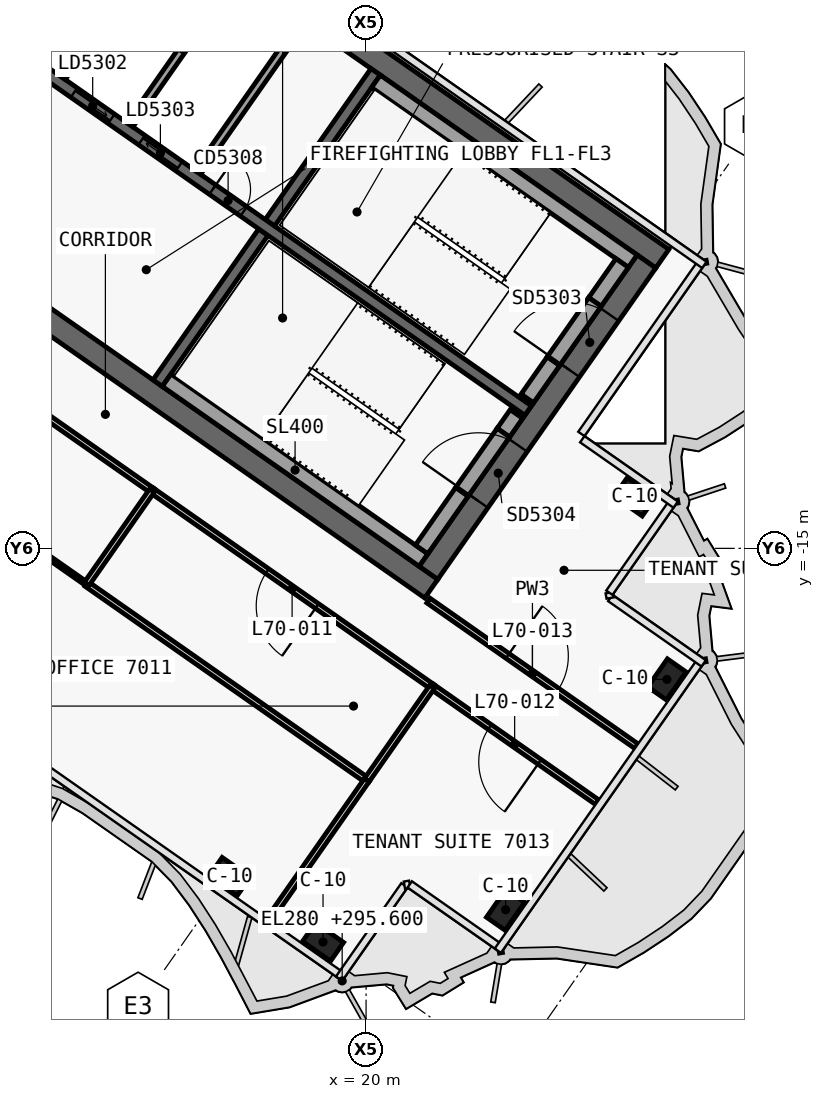
"""IFC4 building model, lengths in metres.
Left out: names, types, materials, properties, quantities, classifications, styles, units other than length and angle.
Written with IfcOpenShell. Run it as: python <this file> out.ifc"""

import sys

from ifc_helpers import new_model, si_unit, direction, frame, frame_2d, origin, origin_2d, place, context, subcontext, project, spatial, polyline, rectangle, outline, extrude, element, fill, save


model = new_model("IFC4")
c1 = context("Model", 3, precision=1e-05, world=origin(), true_north=direction((0.0, 1.0)))
c2 = subcontext(c1, "Body", "Model", "MODEL_VIEW")
j1 = project(units=[si_unit("LENGTHUNIT", "METRE"), si_unit("PLANEANGLEUNIT", "RADIAN")], contexts=[c1])
p1 = place(None, origin())
s1 = spatial("IfcSite", under=j1, at=p1, CompositionType="ELEMENT")
p2 = place(p1, origin())
s2 = spatial("IfcBuilding", under=s1, at=p2, CompositionType="ELEMENT")
p3 = place(p2, frame((0.0, 0.0, 295.6)))
s3 = spatial("IfcBuildingStorey", under=s2, at=p3, CompositionType="ELEMENT", Elevation=295.6)
p4 = place(p3, frame((0.028, 12.066, 0.0), z_axis=(0.0, 0.0, 1.0), x_axis=(0.819151382952, -0.573577380837, 0.0)))
e1 = element("IfcWall", 1, at=p4, inside=s3, PredefinedType="SHEAR", context=c2, shape_type="SweptSolid", body=[
    extrude(outline(polyline([(33.898, 0.3), (0.0, 0.3), (0.42, -0.3), (33.898, -0.3), (33.898, 0.3)])), origin(), (0.0, 0.0, 1.0), 3.9),
])
p5 = place(p3, frame((0.028, -0.874, 0.0), z_axis=(0.0, 0.0, 1.0), x_axis=(0.819150035022, -0.573579305871, 0.0)))
e2 = element("IfcWall", 2, at=p5, inside=s3, PredefinedType="SHEAR", context=c2, shape_type="SweptSolid", body=[
    extrude(outline(polyline([(26.476, 0.3), (0.0, 0.3), (0.42, -0.3), (26.476, -0.3), (26.476, 0.3)])), origin(), (0.0, 0.0, 1.0), 3.9),
])
p6 = place(p5, frame((6.576, 0.0, 0.0)))
e3 = element("IfcOpeningElement", 3, at=p6, cuts=e2, PredefinedType="OPENING", context=c2, shape_type="SweptSolid", body=[
    extrude(rectangle(XDim=1.5, YDim=2.1, at=frame_2d((0.75, 1.05))), frame((0.0, 0.31, 0.0), z_axis=(0.0, -1.0, 0.0), x_axis=(1.0, 0.0, 0.0)), (0.0, 0.0, 1.0), 0.62),
])
p7 = place(p5, frame((12.226, 0.0, 0.0)))
e4 = element("IfcOpeningElement", 4, at=p7, cuts=e2, PredefinedType="OPENING", context=c2, shape_type="SweptSolid", body=[
    extrude(rectangle(XDim=1.5, YDim=2.1, at=frame_2d((0.75, 1.05))), frame((0.0, 0.31, 0.0), z_axis=(0.0, -1.0, 0.0), x_axis=(1.0, 0.0, 0.0)), (0.0, 0.0, 1.0), 0.62),
])
p8 = place(p3, frame((21.642, -15.642, 0.0), z_axis=(0.0, 0.0, 1.0), x_axis=(0.573586866468, 0.819144740944, 0.0)))
e5 = element("IfcWall", 5, at=p8, inside=s3, PredefinedType="SHEAR", context=c2, shape_type="SweptSolid", body=[
    extrude(outline(polyline([(10.0, 0.3), (0.0, 0.3), (0.0, -0.3), (10.0, -0.3), (10.0, 0.3)])), origin(), (0.0, 0.0, 1.0), 3.9),
])
p9 = place(p8, frame((6.5, 0.0, 0.0)))
e6 = element("IfcOpeningElement", 6, at=p9, cuts=e5, PredefinedType="OPENING", context=c2, shape_type="SweptSolid", body=[
    extrude(rectangle(XDim=1.8, YDim=2.1, at=frame_2d((0.9, 1.05))), frame((0.0, 0.31, 0.0), z_axis=(0.0, -1.0, 0.0), x_axis=(1.0, 0.0, 0.0)), (0.0, 0.0, 1.0), 0.62),
])
p10 = place(p8, frame((2.3, 0.0, 0.0)))
e7 = element("IfcOpeningElement", 7, at=p10, cuts=e5, PredefinedType="OPENING", context=c2, shape_type="SweptSolid", body=[
    extrude(rectangle(XDim=1.8, YDim=2.1, at=frame_2d((0.9, 1.05))), frame((0.0, 0.31, 0.0), z_axis=(0.0, -1.0, 0.0), x_axis=(1.0, 0.0, 0.0)), (0.0, 0.0, 1.0), 0.62),
])
p11 = place(p3, frame((14.515, -10.652, 0.0), z_axis=(0.0, 0.0, 1.0), x_axis=(0.573560315113, 0.819163332265, 0.0)))
e8 = element("IfcWall", 8, at=p11, inside=s3, PredefinedType="SHEAR", context=c2, shape_type="SweptSolid", body=[
    extrude(outline(polyline([(0.0, 0.15), (0.0, -0.15), (4.85, -0.15), (4.85, 0.15), (0.0, 0.15)])), origin(), (0.0, 0.0, 1.0), 3.9),
])
p12 = place(p3, frame((17.469, -6.433, 0.0), z_axis=(0.0, 0.0, 1.0), x_axis=(0.573594092424, 0.81913968109, 0.0)))
e9 = element("IfcWall", 9, at=p12, inside=s3, PredefinedType="SHEAR", context=c2, shape_type="SweptSolid", body=[
    extrude(outline(polyline([(4.85, -0.15), (4.85, 0.15), (0.0, 0.15), (0.0, -0.15), (4.85, -0.15)])), origin(), (0.0, 0.0, 1.0), 3.9),
])
p13 = place(p3, frame((2.638, 3.768, 0.0), z_axis=(0.0, 0.0, 1.0), x_axis=(0.819155014212, -0.573572194837, 0.0)))
e10 = element("IfcWall", 10, at=p13, inside=s3, PredefinedType="SHEAR", context=c2, shape_type="SweptSolid", body=[
    extrude(outline(polyline([(0.0, 0.15), (0.0, -0.15), (26.4, -0.15), (26.4, 0.15), (0.0, 0.15)])), origin(), (0.0, 0.0, 1.0), 3.9),
])
p14 = place(p13, frame((9.637, 0.0, 0.0)))
e11 = element("IfcOpeningElement", 11, at=p14, cuts=e10, PredefinedType="OPENING", context=c2, shape_type="SweptSolid", body=[
    extrude(rectangle(XDim=1.2, YDim=2.1, at=frame_2d((0.6, 1.05))), frame((0.0, 0.16, 0.0), z_axis=(0.0, -1.0, 0.0), x_axis=(1.0, 0.0, 0.0)), (0.0, 0.0, 1.0), 0.32),
])
p15 = place(p13, frame((11.812, 0.0, 0.0)))
e12 = element("IfcOpeningElement", 12, at=p15, cuts=e10, PredefinedType="OPENING", context=c2, shape_type="SweptSolid", body=[
    extrude(rectangle(XDim=1.2, YDim=2.1, at=frame_2d((0.6, 1.05))), frame((0.0, 0.16, 0.0), z_axis=(0.0, -1.0, 0.0), x_axis=(1.0, 0.0, 0.0)), (0.0, 0.0, 1.0), 0.32),
])
p16 = place(p13, frame((13.988, 0.0, 0.0)))
e13 = element("IfcOpeningElement", 13, at=p16, cuts=e10, PredefinedType="OPENING", context=c2, shape_type="SweptSolid", body=[
    extrude(rectangle(XDim=1.2, YDim=2.1, at=frame_2d((0.6, 1.05))), frame((0.0, 0.16, 0.0), z_axis=(0.0, -1.0, 0.0), x_axis=(1.0, 0.0, 0.0)), (0.0, 0.0, 1.0), 0.32),
])
p17 = place(p13, frame((16.262, 0.0, 0.0)))
e14 = element("IfcOpeningElement", 14, at=p17, cuts=e10, PredefinedType="OPENING", context=c2, shape_type="SweptSolid", body=[
    extrude(rectangle(XDim=1.0, YDim=2.1, at=frame_2d((0.5, 1.05))), frame((0.0, 0.16, 0.0), z_axis=(0.0, -1.0, 0.0), x_axis=(1.0, 0.0, 0.0)), (0.0, 0.0, 1.0), 0.32),
])
for number, where, z_axis, x_axis in (
    (15, (16.41, -23.637, 0.0), (0.0, 0.0, 1.0), (0.819, -0.574, 0.0)),
    (16, (18.867, -25.358, 0.0), (0.0, 0.0, 1.0), (0.819, -0.574, 0.0)),
    (17, (27.07, -13.644, 0.0), (0.0, 0.0, 1.0), (0.819, -0.574, 0.0)),
    (18, (23.672, -24.51, 0.0), (0.0, 0.0, 1.0), (0.574, 0.819, 0.0)),
    (19, (27.917, -18.449, 0.0), (0.0, 0.0, 1.0), (0.574, 0.819, 0.0)),
):
    element("IfcColumn", number, at=place(p3, frame(where, z_axis=z_axis, x_axis=x_axis)), inside=s3, PredefinedType="COLUMN", context=c2, shape_type="SweptSolid", body=[
        extrude(rectangle(XDim=0.9, YDim=0.6, at=origin_2d()), origin(), (0.0, 0.0, 1.0), 3.9),
    ])
p18 = place(p3, frame((12.001, -2.605, 0.0), z_axis=(0.0, 0.0, 1.0), x_axis=(0.573560315113, 0.819163332265, 0.0)))
e20 = element("IfcWall", 20, at=p18, inside=s3, PredefinedType="SOLIDWALL", context=c2, shape_type="SweptSolid", body=[
    extrude(rectangle(XDim=4.85, YDim=0.2, at=frame_2d((2.425, 0.0))), origin(), (0.0, 0.0, 1.0), 3.9),
])
p19 = place(p3, frame((13.783, -3.852, 0.0), z_axis=(0.0, 0.0, 1.0), x_axis=(0.573594092424, 0.81913968109, 0.0)))
e21 = element("IfcWall", 21, at=p19, inside=s3, PredefinedType="SOLIDWALL", context=c2, shape_type="SweptSolid", body=[
    extrude(rectangle(XDim=4.85, YDim=0.2, at=frame_2d((2.425, 0.0))), origin(), (0.0, 0.0, 1.0), 3.9),
])
p20 = place(p3, frame((15.565, -5.1, 0.0), z_axis=(0.0, 0.0, 1.0), x_axis=(0.573560315113, 0.819163332265, 0.0)))
e22 = element("IfcWall", 22, at=p20, inside=s3, PredefinedType="SOLIDWALL", context=c2, shape_type="SweptSolid", body=[
    extrude(rectangle(XDim=4.85, YDim=0.2, at=frame_2d((2.425, 0.0))), origin(), (0.0, 0.0, 1.0), 3.9),
])
p21 = place(p3, frame((20.259, -2.71, 0.0), z_axis=(0.0, 0.0, 1.0), x_axis=(0.81914849389, -0.573581506813, 0.0)))
e23 = element("IfcWall", 23, at=p21, inside=s3, PredefinedType="SOLIDWALL", context=c2, shape_type="SweptSolid", body=[
    extrude(rectangle(XDim=8.25, YDim=0.4, at=frame_2d((4.125, 0.0))), origin(), (0.0, 0.0, 1.0), 3.62),
])
p22 = place(p3, frame((24.244, -11.055, 0.0), z_axis=(0.0, 0.0, 1.0), x_axis=(0.573571582932, 0.819155442668, 0.0)))
e24 = element("IfcWall", 24, at=p22, inside=s3, PredefinedType="SOLIDWALL", context=c2, shape_type="SweptSolid", body=[
    extrude(rectangle(XDim=1.2, YDim=0.4, at=frame_2d((0.6, 0.0))), origin(), (0.0, 0.0, 1.0), 3.62),
])
p23 = place(p3, frame((26.022, -8.515, 0.0), z_axis=(0.0, 0.0, 1.0), x_axis=(0.573619628835, 0.819121798889, 0.0)))
e25 = element("IfcWall", 25, at=p23, inside=s3, PredefinedType="SOLIDWALL", context=c2, shape_type="SweptSolid", body=[
    extrude(rectangle(XDim=1.25, YDim=0.4, at=frame_2d((0.625, 0.0))), origin(), (0.0, 0.0, 1.0), 3.62),
])
p24 = place(p3, frame((24.932, -10.072, 2.15), z_axis=(0.0, 0.0, 1.0), x_axis=(0.573591692345, 0.819141361715, 0.0)))
e26 = element("IfcWall", 26, at=p24, inside=s3, PredefinedType="SOLIDWALL", context=c2, shape_type="SweptSolid", body=[
    extrude(rectangle(XDim=1.9, YDim=0.4, at=frame_2d((0.95, 0.0))), origin(), (0.0, 0.0, 1.0), 1.47),
])
p25 = place(p3, frame((14.753, -10.574, 0.0), z_axis=(0.0, 0.0, 1.0), x_axis=(0.819158229677, -0.573567602601, 0.0)))
e27 = element("IfcWall", 27, at=p25, inside=s3, PredefinedType="SOLIDWALL", context=c2, shape_type="SweptSolid", body=[
    extrude(rectangle(XDim=8.25, YDim=0.4, at=frame_2d((4.125, 0.0))), origin(), (0.0, 0.0, 1.0), 3.62),
])
p26 = place(p3, frame((21.462, -15.028, 0.0), z_axis=(0.0, 0.0, 1.0), x_axis=(0.573559770908, 0.819163713305, 0.0)))
e28 = element("IfcWall", 28, at=p26, inside=s3, PredefinedType="SOLIDWALL", context=c2, shape_type="SweptSolid", body=[
    extrude(rectangle(XDim=1.85, YDim=0.4, at=frame_2d((0.925, 0.0))), origin(), (0.0, 0.0, 1.0), 3.62),
])
p27 = place(p3, frame((23.613, -11.956, 0.0), z_axis=(0.0, 0.0, 1.0), x_axis=(0.573435029941, 0.819251039936, 0.0)))
e29 = element("IfcWall", 29, at=p27, inside=s3, PredefinedType="SOLIDWALL", context=c2, shape_type="SweptSolid", body=[
    extrude(rectangle(XDim=0.6, YDim=0.4, at=frame_2d((0.3, 0.0))), origin(), (0.0, 0.0, 1.0), 3.62),
])
p28 = place(p3, frame((22.523, -13.512, 2.15), z_axis=(0.0, 0.0, 1.0), x_axis=(0.573591692345, 0.819141361715, 0.0)))
e30 = element("IfcWall", 30, at=p28, inside=s3, PredefinedType="SOLIDWALL", context=c2, shape_type="SweptSolid", body=[
    extrude(rectangle(XDim=1.9, YDim=0.4, at=frame_2d((0.95, 0.0))), origin(), (0.0, 0.0, 1.0), 1.47),
])
p29 = place(p3, frame((21.642, -16.375, 0.0), z_axis=(0.0, 0.0, 1.0), x_axis=(0.819147777977, -0.573582529227, 0.0)))
e31 = element("IfcWall", 31, at=p29, inside=s3, PredefinedType="PARTITIONING", context=c2, shape_type="SweptSolid", body=[
    extrude(rectangle(XDim=6.68, YDim=0.15, at=frame_2d((3.34, 0.0))), origin(), (0.0, 0.0, 1.0), 3.0),
])
p30 = place(p29, frame((2.54, 0.0, 0.0)))
e32 = element("IfcOpeningElement", 32, at=p30, cuts=e31, PredefinedType="OPENING", context=c2, shape_type="SweptSolid", body=[
    extrude(rectangle(XDim=1.6, YDim=2.1, at=frame_2d((0.8, 1.05))), frame((0.0, 0.085, 0.0), z_axis=(0.0, -1.0, 0.0), x_axis=(1.0, 0.0, 0.0)), (0.0, 0.0, 1.0), 0.17),
])
p31 = place(p3, frame((14.369, -13.479, 0.0), z_axis=(0.0, 0.0, 1.0), x_axis=(-0.819154371039, 0.573573113393, 0.0)))
e33 = element("IfcWall", 33, at=p31, inside=s3, PredefinedType="PARTITIONING", context=c2, shape_type="SweptSolid", body=[
    extrude(rectangle(XDim=10.502, YDim=0.15, at=frame_2d((5.251, 0.0))), origin(), (0.0, 0.0, 1.0), 3.05),
])
p32 = place(p31, frame((4.451, 0.0, 0.0)))
e34 = element("IfcOpeningElement", 34, at=p32, cuts=e33, PredefinedType="OPENING", context=c2, shape_type="SweptSolid", body=[
    extrude(rectangle(XDim=1.6, YDim=2.1, at=frame_2d((0.8, 1.05))), frame((0.0, 0.085, 0.0), z_axis=(0.0, -1.0, 0.0), x_axis=(1.0, 0.0, 0.0)), (0.0, 0.0, 1.0), 0.17),
])
p33 = place(p3, frame((21.741, -18.642, 0.0), z_axis=(0.0, 0.0, 1.0), x_axis=(-0.819164400877, 0.57355878891, 0.0)))
e35 = element("IfcWall", 35, at=p33, inside=s3, PredefinedType="PARTITIONING", context=c2, shape_type="SweptSolid", body=[
    extrude(rectangle(XDim=9.004, YDim=0.15, at=frame_2d((4.502, 0.0))), origin(), (0.0, 0.0, 1.0), 3.05),
])
p34 = place(p33, frame((3.702, 0.0, 0.0)))
e36 = element("IfcOpeningElement", 36, at=p34, cuts=e35, PredefinedType="OPENING", context=c2, shape_type="SweptSolid", body=[
    extrude(rectangle(XDim=1.6, YDim=2.1, at=frame_2d((0.8, 1.05))), frame((0.0, 0.085, 0.0), z_axis=(0.0, -1.0, 0.0), x_axis=(1.0, 0.0, 0.0)), (0.0, 0.0, 1.0), 0.17),
])
p35 = place(p3, frame((26.081, -21.68, 0.0), z_axis=(0.0, 0.0, 1.0), x_axis=(-0.81915186898, 0.573576686718, 0.0)))
e37 = element("IfcWall", 37, at=p35, inside=s3, PredefinedType="PARTITIONING", context=c2, shape_type="SweptSolid", body=[
    extrude(rectangle(XDim=5.302, YDim=0.15, at=frame_2d((2.651, 0.0))), origin(), (0.0, 0.0, 1.0), 3.0),
])
p36 = place(p35, frame((1.851, 0.0, 0.0)))
e38 = element("IfcOpeningElement", 38, at=p36, cuts=e37, PredefinedType="OPENING", context=c2, shape_type="SweptSolid", body=[
    extrude(rectangle(XDim=1.6, YDim=2.1, at=frame_2d((0.8, 1.05))), frame((0.0, 0.085, 0.0), z_axis=(0.0, -1.0, 0.0), x_axis=(1.0, 0.0, 0.0)), (0.0, 0.0, 1.0), 0.17),
])
p37 = place(p3, frame((12.646, -15.937, 0.0), z_axis=(0.0, 0.0, 1.0), x_axis=(-0.81914779845, 0.57358249999, 0.0)))
e39 = element("IfcWall", 39, at=p37, inside=s3, PredefinedType="PARTITIONING", context=c2, shape_type="SweptSolid", body=[
    extrude(rectangle(XDim=10.5, YDim=0.1, at=frame_2d((5.25, 0.0))), origin(), (0.0, 0.0, 1.0), 3.05),
])
p38 = place(p37, frame((4.8, 0.0, 0.0)))
e40 = element("IfcOpeningElement", 40, at=p38, cuts=e39, PredefinedType="OPENING", context=c2, shape_type="SweptSolid", body=[
    extrude(rectangle(XDim=0.9, YDim=2.1, at=frame_2d((0.45, 1.05))), frame((0.0, 0.06, 0.0), z_axis=(0.0, -1.0, 0.0), x_axis=(1.0, 0.0, 0.0)), (0.0, 0.0, 1.0), 0.12),
])
p39 = place(p3, frame((12.646, -15.937, 0.0), z_axis=(0.0, 0.0, 1.0), x_axis=(0.819150352239, -0.573578852841, 0.0)))
e41 = element("IfcWall", 41, at=p39, inside=s3, PredefinedType="PARTITIONING", context=c2, shape_type="SweptSolid", body=[
    extrude(rectangle(XDim=9.0, YDim=0.15, at=frame_2d((4.5, 0.0))), origin(), (0.0, 0.0, 1.0), 3.05),
])
p40 = place(p3, frame((20.019, -21.099, 0.0), z_axis=(0.0, 0.0, 1.0), x_axis=(-0.573589807488, -0.819142681555, 0.0)))
e42 = element("IfcWall", 42, at=p40, inside=s3, PredefinedType="PARTITIONING", context=c2, shape_type="SweptSolid", body=[
    extrude(rectangle(XDim=4.499, YDim=0.15, at=frame_2d((2.25, 0.0))), origin(), (0.0, 0.0, 1.0), 3.0),
])
p41 = place(p3, frame((14.367, -13.479, 0.0), z_axis=(0.0, 0.0, 1.0), x_axis=(-0.573598887793, -0.819136323161, 0.0)))
e43 = element("IfcWall", 43, at=p41, inside=s3, PredefinedType="PARTITIONING", context=c2, shape_type="SweptSolid", body=[
    extrude(rectangle(XDim=3.0, YDim=0.15, at=frame_2d((1.5, 0.0))), origin(), (0.0, 0.0, 1.0), 3.62),
])
p42 = place(p3, frame((21.74, -18.641, 0.0), z_axis=(0.0, 0.0, 1.0), x_axis=(-0.573598887793, -0.819136323161, 0.0)))
e44 = element("IfcWall", 44, at=p42, inside=s3, PredefinedType="PARTITIONING", context=c2, shape_type="SweptSolid", body=[
    extrude(rectangle(XDim=3.0, YDim=0.15, at=frame_2d((1.5, 0.0))), origin(), (0.0, 0.0, 1.0), 3.05),
])
p43 = place(p15, origin())
e45 = element("IfcDoor", 45, at=p43, inside=s3, OperationType="SLIDING_TO_RIGHT", PredefinedType="DOOR", context=c2, shape_type="SweptSolid", body=[
    extrude(rectangle(XDim=1.2, YDim=2.1, at=frame_2d((0.6, 1.05))), frame((0.0, 0.025, 0.0), z_axis=(0.0, -1.0, 0.0), x_axis=(1.0, 0.0, 0.0)), (0.0, 0.0, 1.0), 0.05),
])
fill(e12, e45)
p44 = place(p16, origin())
e46 = element("IfcDoor", 46, at=p44, inside=s3, OperationType="SLIDING_TO_LEFT", PredefinedType="DOOR", context=c2, shape_type="SweptSolid", body=[
    extrude(rectangle(XDim=1.2, YDim=2.1, at=frame_2d((0.6, 1.05))), frame((0.0, 0.025, 0.0), z_axis=(0.0, -1.0, 0.0), x_axis=(1.0, 0.0, 0.0)), (0.0, 0.0, 1.0), 0.05),
])
fill(e13, e46)
p45 = place(p17, origin())
e47 = element("IfcDoor", 47, at=p45, inside=s3, OperationType="SINGLE_SWING_RIGHT", PredefinedType="DOOR", context=c2, shape_type="SweptSolid", body=[
    extrude(rectangle(XDim=1.0, YDim=2.1, at=frame_2d((0.5, 1.05))), frame((0.0, 0.025, 0.0), z_axis=(0.0, -1.0, 0.0), x_axis=(1.0, 0.0, 0.0)), (0.0, 0.0, 1.0), 0.05),
])
fill(e14, e47)
p46 = place(p9, origin())
e48 = element("IfcDoor", 48, at=p46, inside=s3, OperationType="DOUBLE_DOOR_SINGLE_SWING", PredefinedType="DOOR", context=c2, shape_type="SweptSolid", body=[
    extrude(rectangle(XDim=1.8, YDim=2.1, at=frame_2d((0.9, 1.05))), frame((0.0, 0.025, 0.0), z_axis=(0.0, -1.0, 0.0), x_axis=(1.0, 0.0, 0.0)), (0.0, 0.0, 1.0), 0.05),
])
fill(e6, e48)
p47 = place(p10, origin())
e49 = element("IfcDoor", 49, at=p47, inside=s3, OperationType="DOUBLE_DOOR_SINGLE_SWING", PredefinedType="DOOR", context=c2, shape_type="SweptSolid", body=[
    extrude(rectangle(XDim=1.8, YDim=2.1, at=frame_2d((0.9, 1.05))), frame((0.0, 0.025, 0.0), z_axis=(0.0, -1.0, 0.0), x_axis=(1.0, 0.0, 0.0)), (0.0, 0.0, 1.0), 0.05),
])
fill(e7, e49)
p48 = place(p34, origin())
e50 = element("IfcDoor", 50, at=p48, inside=s3, OperationType="DOUBLE_DOOR_SINGLE_SWING", PredefinedType="DOOR", context=c2, shape_type="SweptSolid", body=[
    extrude(rectangle(XDim=1.6, YDim=2.1, at=frame_2d((0.8, 1.05))), frame((0.0, 0.025, 0.0), z_axis=(0.0, -1.0, 0.0), x_axis=(1.0, 0.0, 0.0)), (0.0, 0.0, 1.0), 0.05),
])
fill(e36, e50)
p49 = place(p36, origin())
e51 = element("IfcDoor", 51, at=p49, inside=s3, OperationType="DOUBLE_DOOR_SINGLE_SWING", PredefinedType="DOOR", context=c2, shape_type="SweptSolid", body=[
    extrude(rectangle(XDim=1.6, YDim=2.1, at=frame_2d((0.8, 1.05))), frame((0.0, 0.025, 0.0), z_axis=(0.0, -1.0, 0.0), x_axis=(1.0, 0.0, 0.0)), (0.0, 0.0, 1.0), 0.05),
])
fill(e38, e51)
p50 = place(p30, origin())
e52 = element("IfcDoor", 52, at=p50, inside=s3, OperationType="DOUBLE_DOOR_SINGLE_SWING", PredefinedType="DOOR", context=c2, shape_type="SweptSolid", body=[
    extrude(rectangle(XDim=1.6, YDim=2.1, at=frame_2d((0.8, 1.05))), frame((0.0, 0.025, 0.0), z_axis=(0.0, -1.0, 0.0), x_axis=(1.0, 0.0, 0.0)), (0.0, 0.0, 1.0), 0.05),
])
fill(e32, e52)
save(model, sys.argv[1])
